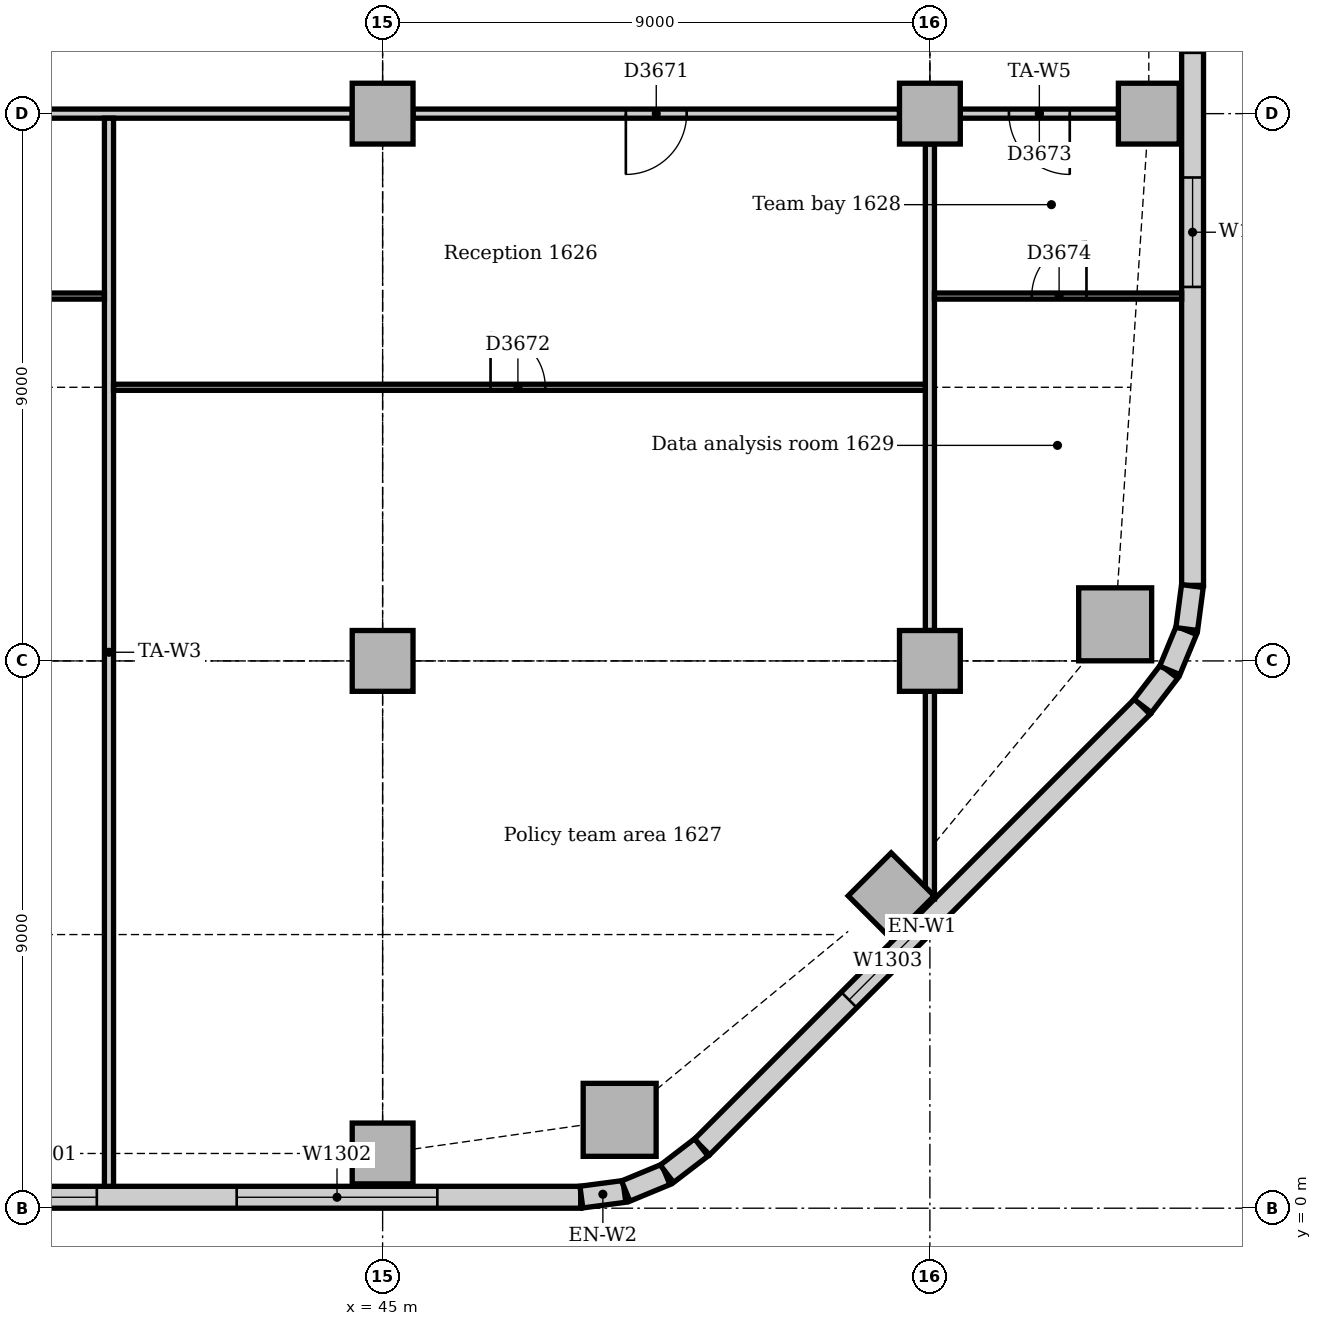
"""IFC4 building model, lengths in metres.
Left out: names, types, materials, properties, quantities, classifications, styles, units other than length and angle.
Written with IfcOpenShell. Run it as: python <this file> out.ifc"""

import sys

from ifc_helpers import new_model, si_unit, direction, frame, frame_2d, origin, origin_2d, place, context, subcontext, project, spatial, rectangle, extrude, element, fill, save


model = new_model("IFC4")
c1 = context("Model", 3, precision=1e-05, world=origin(), true_north=direction((0.0, 1.0)))
c2 = subcontext(c1, "Body", "Model", "MODEL_VIEW")
j1 = project(units=[si_unit("LENGTHUNIT", "METRE"), si_unit("PLANEANGLEUNIT", "RADIAN")], contexts=[c1])
p1 = place(None, origin())
s1 = spatial("IfcSite", under=j1, at=p1, CompositionType="ELEMENT")
p2 = place(p1, origin())
s2 = spatial("IfcBuilding", under=s1, at=p2, CompositionType="ELEMENT")
p3 = place(p2, frame((0.0, 0.0, 71.0)))
s3 = spatial("IfcBuildingStorey", under=s2, at=p3, CompositionType="ELEMENT", Elevation=71.0)
for number, where, z_axis, x_axis in (
    (1, (48.898, 1.453, 0.0), (0.0, 0.0, 1.0), (1.0, 0.0, 0.0)),
    (2, (57.047, 9.602, 0.0), (0.0, 0.0, 1.0), (1.0, 0.0, 0.0)),
):
    element("IfcColumn", number, at=place(p3, frame(where, z_axis=z_axis, x_axis=x_axis)), inside=s3, PredefinedType="COLUMN", context=c2, shape_type="SweptSolid", body=[
        extrude(rectangle(XDim=1.2, YDim=1.2, at=origin_2d()), origin(), (0.0, 0.0, 1.0), 3.85),
    ])
for number, where, z_axis, x_axis in (
    (3, (45.0, 0.9, 0.0), (0.0, 0.0, 1.0), (1.0, 0.0, 0.0)),
    (4, (53.364, 5.136, 0.0), (0.0, 0.0, 1.0), (0.707, 0.707, 0.0)),
    (5, (57.6, 18.0, 0.0), (0.0, 0.0, 1.0), (1.0, 0.0, 0.0)),
    (6, (45.0, 9.0, 0.0), (0.0, 0.0, 1.0), (1.0, 0.0, 0.0)),
    (7, (45.0, 18.0, 0.0), (0.0, 0.0, 1.0), (1.0, 0.0, 0.0)),
    (8, (54.0, 9.0, 0.0), (0.0, 0.0, 1.0), (1.0, 0.0, 0.0)),
    (9, (54.0, 18.0, 0.0), (0.0, 0.0, 1.0), (1.0, 0.0, 0.0)),
):
    element("IfcColumn", number, at=place(p3, frame(where, z_axis=z_axis, x_axis=x_axis)), inside=s3, PredefinedType="COLUMN", context=c2, shape_type="SweptSolid", body=[
        extrude(rectangle(XDim=1.0, YDim=1.0, at=origin_2d()), origin(), (0.0, 0.0, 1.0), 3.85),
    ])
p4 = place(p3, frame((4.243, 0.18, 0.0), z_axis=(0.0, 0.0, 1.0), x_axis=(1.0, 0.0, 0.0)))
e10 = element("IfcWall", 10, at=p4, inside=s3, PredefinedType="STANDARD", context=c2, shape_type="SweptSolid", body=[
    extrude(rectangle(XDim=44.015, YDim=0.36, at=frame_2d((22.007, 0.0))), origin(), (0.0, 0.0, 1.0), 3.85),
])
p5 = place(p4, frame((2.357, 0.0, 0.9)))
e11 = element("IfcOpeningElement", 11, at=p5, cuts=e10, PredefinedType="OPENING", context=c2, shape_type="SweptSolid", body=[
    extrude(rectangle(XDim=3.3, YDim=1.6, at=frame_2d((1.65, 0.8))), frame((0.0, 0.19, 0.0), z_axis=(0.0, -1.0, 0.0), x_axis=(1.0, 0.0, 0.0)), (0.0, 0.0, 1.0), 0.38),
])
p6 = place(p4, frame((7.257, 0.0, 0.9)))
e12 = element("IfcOpeningElement", 12, at=p6, cuts=e10, PredefinedType="OPENING", context=c2, shape_type="SweptSolid", body=[
    extrude(rectangle(XDim=1.8, YDim=1.6, at=frame_2d((0.9, 0.8))), frame((0.0, 0.19, 0.0), z_axis=(0.0, -1.0, 0.0), x_axis=(1.0, 0.0, 0.0)), (0.0, 0.0, 1.0), 0.38),
])
p7 = place(p4, frame((11.357, 0.0, 0.9)))
e13 = element("IfcOpeningElement", 13, at=p7, cuts=e10, PredefinedType="OPENING", context=c2, shape_type="SweptSolid", body=[
    extrude(rectangle(XDim=3.3, YDim=1.6, at=frame_2d((1.65, 0.8))), frame((0.0, 0.19, 0.0), z_axis=(0.0, -1.0, 0.0), x_axis=(1.0, 0.0, 0.0)), (0.0, 0.0, 1.0), 0.38),
])
p8 = place(p4, frame((15.857, 0.0, 0.9)))
e14 = element("IfcOpeningElement", 14, at=p8, cuts=e10, PredefinedType="OPENING", context=c2, shape_type="SweptSolid", body=[
    extrude(rectangle(XDim=3.3, YDim=1.6, at=frame_2d((1.65, 0.8))), frame((0.0, 0.19, 0.0), z_axis=(0.0, -1.0, 0.0), x_axis=(1.0, 0.0, 0.0)), (0.0, 0.0, 1.0), 0.38),
])
p9 = place(p4, frame((20.357, 0.0, 0.9)))
e15 = element("IfcOpeningElement", 15, at=p9, cuts=e10, PredefinedType="OPENING", context=c2, shape_type="SweptSolid", body=[
    extrude(rectangle(XDim=3.3, YDim=1.6, at=frame_2d((1.65, 0.8))), frame((0.0, 0.19, 0.0), z_axis=(0.0, -1.0, 0.0), x_axis=(1.0, 0.0, 0.0)), (0.0, 0.0, 1.0), 0.38),
])
p10 = place(p4, frame((24.857, 0.0, 0.9)))
e16 = element("IfcOpeningElement", 16, at=p10, cuts=e10, PredefinedType="OPENING", context=c2, shape_type="SweptSolid", body=[
    extrude(rectangle(XDim=3.3, YDim=1.6, at=frame_2d((1.65, 0.8))), frame((0.0, 0.19, 0.0), z_axis=(0.0, -1.0, 0.0), x_axis=(1.0, 0.0, 0.0)), (0.0, 0.0, 1.0), 0.38),
])
p11 = place(p4, frame((29.707, 0.0, 0.9)))
e17 = element("IfcOpeningElement", 17, at=p11, cuts=e10, PredefinedType="OPENING", context=c2, shape_type="SweptSolid", body=[
    extrude(rectangle(XDim=3.3, YDim=1.6, at=frame_2d((1.65, 0.8))), frame((0.0, 0.19, 0.0), z_axis=(0.0, -1.0, 0.0), x_axis=(1.0, 0.0, 0.0)), (0.0, 0.0, 1.0), 0.38),
])
p12 = place(p4, frame((34.257, 0.0, 0.9)))
e18 = element("IfcOpeningElement", 18, at=p12, cuts=e10, PredefinedType="OPENING", context=c2, shape_type="SweptSolid", body=[
    extrude(rectangle(XDim=1.8, YDim=1.6, at=frame_2d((0.9, 0.8))), frame((0.0, 0.19, 0.0), z_axis=(0.0, -1.0, 0.0), x_axis=(1.0, 0.0, 0.0)), (0.0, 0.0, 1.0), 0.38),
])
p13 = place(p4, frame((38.357, 0.0, 0.9)))
e19 = element("IfcOpeningElement", 19, at=p13, cuts=e10, PredefinedType="OPENING", context=c2, shape_type="SweptSolid", body=[
    extrude(rectangle(XDim=3.3, YDim=1.6, at=frame_2d((1.65, 0.8))), frame((0.0, 0.19, 0.0), z_axis=(0.0, -1.0, 0.0), x_axis=(1.0, 0.0, 0.0)), (0.0, 0.0, 1.0), 0.38),
])
p14 = place(p3, frame((50.251, 1.006, 0.0), z_axis=(0.0, 0.0, 1.0), x_axis=(0.707106781187, 0.707106781187, 0.0)))
e20 = element("IfcWall", 20, at=p14, inside=s3, PredefinedType="STANDARD", context=c2, shape_type="SweptSolid", body=[
    extrude(rectangle(XDim=10.243, YDim=0.36, at=frame_2d((5.121, 0.0))), origin(), (0.0, 0.0, 1.0), 3.85),
])
p15 = place(p14, frame((3.421, 0.0, 0.9)))
e21 = element("IfcOpeningElement", 21, at=p15, cuts=e20, PredefinedType="OPENING", context=c2, shape_type="SweptSolid", body=[
    extrude(rectangle(XDim=1.8, YDim=1.6, at=frame_2d((0.9, 0.8))), frame((0.0, 0.19, 0.0), z_axis=(0.0, -1.0, 0.0), x_axis=(1.0, 0.0, 0.0)), (0.0, 0.0, 1.0), 0.38),
])
p16 = place(p3, frame((58.32, 10.243, 0.0), z_axis=(0.0, 0.0, 1.0), x_axis=(0.0, 1.0, 0.0)))
e22 = element("IfcWall", 22, at=p16, inside=s3, PredefinedType="STANDARD", context=c2, shape_type="SweptSolid", body=[
    extrude(rectangle(XDim=24.515, YDim=0.36, at=frame_2d((12.257, 0.0))), origin(), (0.0, 0.0, 1.0), 3.85),
])
p17 = place(p16, frame((4.907, 0.0, 0.9)))
e23 = element("IfcOpeningElement", 23, at=p17, cuts=e22, PredefinedType="OPENING", context=c2, shape_type="SweptSolid", body=[
    extrude(rectangle(XDim=1.8, YDim=1.6, at=frame_2d((0.9, 0.8))), frame((0.0, 0.19, 0.0), z_axis=(0.0, -1.0, 0.0), x_axis=(1.0, 0.0, 0.0)), (0.0, 0.0, 1.0), 0.38),
])
p18 = place(p16, frame((8.757, 0.0, 0.9)))
e24 = element("IfcOpeningElement", 24, at=p18, cuts=e22, PredefinedType="OPENING", context=c2, shape_type="SweptSolid", body=[
    extrude(rectangle(XDim=1.8, YDim=1.6, at=frame_2d((0.9, 0.8))), frame((0.0, 0.19, 0.0), z_axis=(0.0, -1.0, 0.0), x_axis=(1.0, 0.0, 0.0)), (0.0, 0.0, 1.0), 0.38),
])
p19 = place(p16, frame((12.857, 0.0, 0.9)))
e25 = element("IfcOpeningElement", 25, at=p19, cuts=e22, PredefinedType="OPENING", context=c2, shape_type="SweptSolid", body=[
    extrude(rectangle(XDim=3.3, YDim=1.6, at=frame_2d((1.65, 0.8))), frame((0.0, 0.19, 0.0), z_axis=(0.0, -1.0, 0.0), x_axis=(1.0, 0.0, 0.0)), (0.0, 0.0, 1.0), 0.38),
])
p20 = place(p16, frame((17.357, 0.0, 0.9)))
e26 = element("IfcOpeningElement", 26, at=p20, cuts=e22, PredefinedType="OPENING", context=c2, shape_type="SweptSolid", body=[
    extrude(rectangle(XDim=3.3, YDim=1.6, at=frame_2d((1.65, 0.8))), frame((0.0, 0.19, 0.0), z_axis=(0.0, -1.0, 0.0), x_axis=(1.0, 0.0, 0.0)), (0.0, 0.0, 1.0), 0.38),
])
for number, where, z_axis, x_axis in (
    (27, (48.269, 0.183, 0.0), (0.0, 0.0, 1.0), (0.991, 0.131, 0.0)),
    (28, (48.997, 0.282, 0.0), (0.0, 0.0, 1.0), (0.924, 0.383, 0.0)),
):
    element("IfcWall", number, at=place(p3, frame(where, z_axis=z_axis, x_axis=x_axis)), inside=s3, PredefinedType="STANDARD", context=c2, shape_type="SweptSolid", body=[
        extrude(rectangle(XDim=0.713, YDim=0.36, at=frame_2d((0.356, 0.0))), origin(), (0.0, 0.0, 1.0), 3.85),
    ])
for number, where, z_axis, x_axis in (
    (29, (49.675, 0.566, 0.0), (0.0, 0.0, 1.0), (0.793, 0.609, 0.0)),
    (30, (57.5, 8.259, 0.0), (0.0, 0.0, 1.0), (0.609, 0.793, 0.0)),
):
    element("IfcWall", number, at=place(p3, frame(where, z_axis=z_axis, x_axis=x_axis)), inside=s3, PredefinedType="STANDARD", context=c2, shape_type="SweptSolid", body=[
        extrude(rectangle(XDim=0.713, YDim=0.36, at=frame_2d((0.357, 0.0))), origin(), (0.0, 0.0, 1.0), 3.85),
    ])
for number, where, z_axis, x_axis in (
    (31, (57.945, 8.844, 0.0), (0.0, 0.0, 1.0), (0.383, 0.924, 0.0)),
    (32, (58.224, 9.524, 0.0), (0.0, 0.0, 1.0), (0.131, 0.991, 0.0)),
):
    element("IfcWall", number, at=place(p3, frame(where, z_axis=z_axis, x_axis=x_axis)), inside=s3, PredefinedType="STANDARD", context=c2, shape_type="SweptSolid", body=[
        extrude(rectangle(XDim=0.713, YDim=0.36, at=frame_2d((0.356, 0.0))), origin(), (0.0, 0.0, 1.0), 3.85),
    ])
p21 = place(p3, frame((54.5, 18.0, 0.0), z_axis=(0.0, 0.0, 1.0), x_axis=(1.0, 0.0, 0.0)))
e33 = element("IfcWall", 33, at=p21, inside=s3, PredefinedType="PARTITIONING", context=c2, shape_type="SweptSolid", body=[
    extrude(rectangle(XDim=2.6, YDim=0.15, at=frame_2d((1.3, 0.0))), origin(), (0.0, 0.0, 1.0), 3.602),
])
p22 = place(p21, frame((0.8, 0.0, 0.0)))
e34 = element("IfcOpeningElement", 34, at=p22, cuts=e33, PredefinedType="OPENING", context=c2, shape_type="SweptSolid", body=[
    extrude(rectangle(XDim=1.0, YDim=2.1, at=frame_2d((0.5, 1.05))), frame((0.0, 0.085, 0.0), z_axis=(0.0, -1.0, 0.0), x_axis=(1.0, 0.0, 0.0)), (0.0, 0.0, 1.0), 0.17),
])
p23 = place(p3, frame((45.5, 18.0, 0.0), z_axis=(0.0, 0.0, 1.0), x_axis=(1.0, 0.0, 0.0)))
e35 = element("IfcWall", 35, at=p23, inside=s3, PredefinedType="PARTITIONING", context=c2, shape_type="SweptSolid", body=[
    extrude(rectangle(XDim=8.0, YDim=0.15, at=frame_2d((4.0, 0.0))), origin(), (0.0, 0.0, 1.0), 3.15),
])
p24 = place(p23, frame((3.5, 0.0, 0.0)))
e36 = element("IfcOpeningElement", 36, at=p24, cuts=e35, PredefinedType="OPENING", context=c2, shape_type="SweptSolid", body=[
    extrude(rectangle(XDim=1.0, YDim=2.1, at=frame_2d((0.5, 1.05))), frame((0.0, 0.085, 0.0), z_axis=(0.0, -1.0, 0.0), x_axis=(1.0, 0.0, 0.0)), (0.0, 0.0, 1.0), 0.17),
])
p25 = place(p3, frame((36.5, 18.0, 0.0), z_axis=(0.0, 0.0, 1.0), x_axis=(1.0, 0.0, 0.0)))
e37 = element("IfcWall", 37, at=p25, inside=s3, PredefinedType="PARTITIONING", context=c2, shape_type="SweptSolid", body=[
    extrude(rectangle(XDim=8.0, YDim=0.15, at=frame_2d((4.0, 0.0))), origin(), (0.0, 0.0, 1.0), 3.15),
])
p26 = place(p3, frame((40.5, 0.36, 0.0), z_axis=(0.0, 0.0, 1.0), x_axis=(0.0, 1.0, 0.0)))
e38 = element("IfcWall", 38, at=p26, inside=s3, PredefinedType="PARTITIONING", context=c2, shape_type="SweptSolid", body=[
    extrude(rectangle(XDim=17.565, YDim=0.15, at=frame_2d((8.783, 0.0))), origin(), (0.0, 0.0, 1.0), 3.85),
])
p27 = place(p3, frame((54.0, 5.084, 0.0), z_axis=(0.0, 0.0, 1.0), x_axis=(0.0, 1.0, 0.0)))
e39 = element("IfcWall", 39, at=p27, inside=s3, PredefinedType="PARTITIONING", context=c2, shape_type="SweptSolid", body=[
    extrude(rectangle(XDim=3.416, YDim=0.15, at=frame_2d((1.708, 0.0))), origin(), (0.0, 0.0, 1.0), 3.652),
])
p28 = place(p3, frame((54.0, 9.5, 0.0), z_axis=(0.0, 0.0, 1.0), x_axis=(0.0, 1.0, 0.0)))
e40 = element("IfcWall", 40, at=p28, inside=s3, PredefinedType="PARTITIONING", context=c2, shape_type="SweptSolid", body=[
    extrude(rectangle(XDim=8.0, YDim=0.15, at=frame_2d((4.0, 0.0))), origin(), (0.0, 0.0, 1.0), 3.158),
])
p29 = place(p3, frame((27.075, 15.0, 0.0), z_axis=(0.0, 0.0, 1.0), x_axis=(1.0, 0.0, 0.0)))
e41 = element("IfcWall", 41, at=p29, inside=s3, PredefinedType="PARTITIONING", context=c2, shape_type="SweptSolid", body=[
    extrude(rectangle(XDim=13.35, YDim=0.1, at=frame_2d((6.675, 0.0))), origin(), (0.0, 0.0, 1.0), 3.85),
])
p30 = place(p29, frame((2.95, 0.0, 0.0)))
e42 = element("IfcOpeningElement", 42, at=p30, cuts=e41, PredefinedType="OPENING", context=c2, shape_type="SweptSolid", body=[
    extrude(rectangle(XDim=0.9, YDim=2.1, at=frame_2d((0.45, 1.05))), frame((0.0, 0.06, 0.0), z_axis=(0.0, -1.0, 0.0), x_axis=(1.0, 0.0, 0.0)), (0.0, 0.0, 1.0), 0.12),
])
p31 = place(p29, frame((9.475, 0.0, 0.0)))
e43 = element("IfcOpeningElement", 43, at=p31, cuts=e41, PredefinedType="OPENING", context=c2, shape_type="SweptSolid", body=[
    extrude(rectangle(XDim=0.9, YDim=2.1, at=frame_2d((0.45, 1.05))), frame((0.0, 0.06, 0.0), z_axis=(0.0, -1.0, 0.0), x_axis=(1.0, 0.0, 0.0)), (0.0, 0.0, 1.0), 0.12),
])
p32 = place(p3, frame((40.575, 13.5, 0.0), z_axis=(0.0, 0.0, 1.0), x_axis=(1.0, 0.0, 0.0)))
e44 = element("IfcWall", 44, at=p32, inside=s3, PredefinedType="PARTITIONING", context=c2, shape_type="SweptSolid", body=[
    extrude(rectangle(XDim=13.35, YDim=0.1, at=frame_2d((6.675, 0.0))), origin(), (0.0, 0.0, 1.0), 3.35),
])
p33 = place(p32, frame((6.2, 0.0, 0.0)))
e45 = element("IfcOpeningElement", 45, at=p33, cuts=e44, PredefinedType="OPENING", context=c2, shape_type="SweptSolid", body=[
    extrude(rectangle(XDim=0.9, YDim=2.1, at=frame_2d((0.45, 1.05))), frame((0.0, 0.06, 0.0), z_axis=(0.0, -1.0, 0.0), x_axis=(1.0, 0.0, 0.0)), (0.0, 0.0, 1.0), 0.12),
])
p34 = place(p3, frame((54.075, 15.0, 0.0), z_axis=(0.0, 0.0, 1.0), x_axis=(1.0, 0.0, 0.0)))
e46 = element("IfcWall", 46, at=p34, inside=s3, PredefinedType="PARTITIONING", context=c2, shape_type="SweptSolid", body=[
    extrude(rectangle(XDim=4.065, YDim=0.1, at=frame_2d((2.033, 0.0))), origin(), (0.0, 0.0, 1.0), 3.85),
])
p35 = place(p34, frame((1.6, 0.0, 0.0)))
e47 = element("IfcOpeningElement", 47, at=p35, cuts=e46, PredefinedType="OPENING", context=c2, shape_type="SweptSolid", body=[
    extrude(rectangle(XDim=0.9, YDim=2.1, at=frame_2d((0.45, 1.05))), frame((0.0, 0.06, 0.0), z_axis=(0.0, -1.0, 0.0), x_axis=(1.0, 0.0, 0.0)), (0.0, 0.0, 1.0), 0.12),
])
p36 = place(p12, origin())
e48 = element("IfcWindow", 48, at=p36, inside=s3, PartitioningType="SINGLE_PANEL", PredefinedType="WINDOW", context=c2, shape_type="SweptSolid", body=[
    extrude(rectangle(XDim=1.8, YDim=1.6, at=frame_2d((0.9, 0.8))), frame((0.0, 0.13, 0.0), z_axis=(0.0, -1.0, 0.0), x_axis=(1.0, 0.0, 0.0)), (0.0, 0.0, 1.0), 0.06),
])
fill(e18, e48)
p37 = place(p13, origin())
e49 = element("IfcWindow", 49, at=p37, inside=s3, PartitioningType="SINGLE_PANEL", PredefinedType="WINDOW", context=c2, shape_type="SweptSolid", body=[
    extrude(rectangle(XDim=3.3, YDim=1.6, at=frame_2d((1.65, 0.8))), frame((0.0, 0.13, 0.0), z_axis=(0.0, -1.0, 0.0), x_axis=(1.0, 0.0, 0.0)), (0.0, 0.0, 1.0), 0.06),
])
fill(e19, e49)
p38 = place(p15, origin())
e50 = element("IfcWindow", 50, at=p38, inside=s3, PartitioningType="SINGLE_PANEL", PredefinedType="WINDOW", context=c2, shape_type="SweptSolid", body=[
    extrude(rectangle(XDim=1.8, YDim=1.6, at=frame_2d((0.9, 0.8))), frame((0.0, 0.13, 0.0), z_axis=(0.0, -1.0, 0.0), x_axis=(1.0, 0.0, 0.0)), (0.0, 0.0, 1.0), 0.06),
])
fill(e21, e50)
p39 = place(p17, origin())
e51 = element("IfcWindow", 51, at=p39, inside=s3, PartitioningType="SINGLE_PANEL", PredefinedType="WINDOW", context=c2, shape_type="SweptSolid", body=[
    extrude(rectangle(XDim=1.8, YDim=1.6, at=frame_2d((0.9, 0.8))), frame((0.0, 0.13, 0.0), z_axis=(0.0, -1.0, 0.0), x_axis=(1.0, 0.0, 0.0)), (0.0, 0.0, 1.0), 0.06),
])
fill(e23, e51)
p40 = place(p24, frame((1.0, 0.0, 0.0), z_axis=(0.0, 0.0, 1.0), x_axis=(-1.0, 0.0, 0.0)))
e52 = element("IfcDoor", 52, at=p40, inside=s3, OperationType="SINGLE_SWING_RIGHT", PredefinedType="DOOR", context=c2, shape_type="SweptSolid", body=[
    extrude(rectangle(XDim=1.0, YDim=2.1, at=frame_2d((0.5, 1.05))), frame((0.0, 0.025, 0.0), z_axis=(0.0, -1.0, 0.0), x_axis=(1.0, 0.0, 0.0)), (0.0, 0.0, 1.0), 0.05),
])
fill(e36, e52)
p41 = place(p33, origin())
e53 = element("IfcDoor", 53, at=p41, inside=s3, OperationType="SINGLE_SWING_LEFT", PredefinedType="DOOR", context=c2, shape_type="SweptSolid", body=[
    extrude(rectangle(XDim=0.9, YDim=2.1, at=frame_2d((0.45, 1.05))), frame((0.0, 0.025, 0.0), z_axis=(0.0, -1.0, 0.0), x_axis=(1.0, 0.0, 0.0)), (0.0, 0.0, 1.0), 0.05),
])
fill(e45, e53)
p42 = place(p22, frame((1.0, 0.0, 0.0), z_axis=(0.0, 0.0, 1.0), x_axis=(-1.0, 0.0, 0.0)))
e54 = element("IfcDoor", 54, at=p42, inside=s3, OperationType="SINGLE_SWING_LEFT", PredefinedType="DOOR", context=c2, shape_type="SweptSolid", body=[
    extrude(rectangle(XDim=1.0, YDim=2.1, at=frame_2d((0.5, 1.05))), frame((0.0, 0.025, 0.0), z_axis=(0.0, -1.0, 0.0), x_axis=(1.0, 0.0, 0.0)), (0.0, 0.0, 1.0), 0.05),
])
fill(e34, e54)
p43 = place(p35, origin())
e55 = element("IfcDoor", 55, at=p43, inside=s3, OperationType="SINGLE_SWING_RIGHT", PredefinedType="DOOR", context=c2, shape_type="SweptSolid", body=[
    extrude(rectangle(XDim=0.9, YDim=2.1, at=frame_2d((0.45, 1.05))), frame((0.0, 0.025, 0.0), z_axis=(0.0, -1.0, 0.0), x_axis=(1.0, 0.0, 0.0)), (0.0, 0.0, 1.0), 0.05),
])
fill(e47, e55)
save(model, sys.argv[1])
